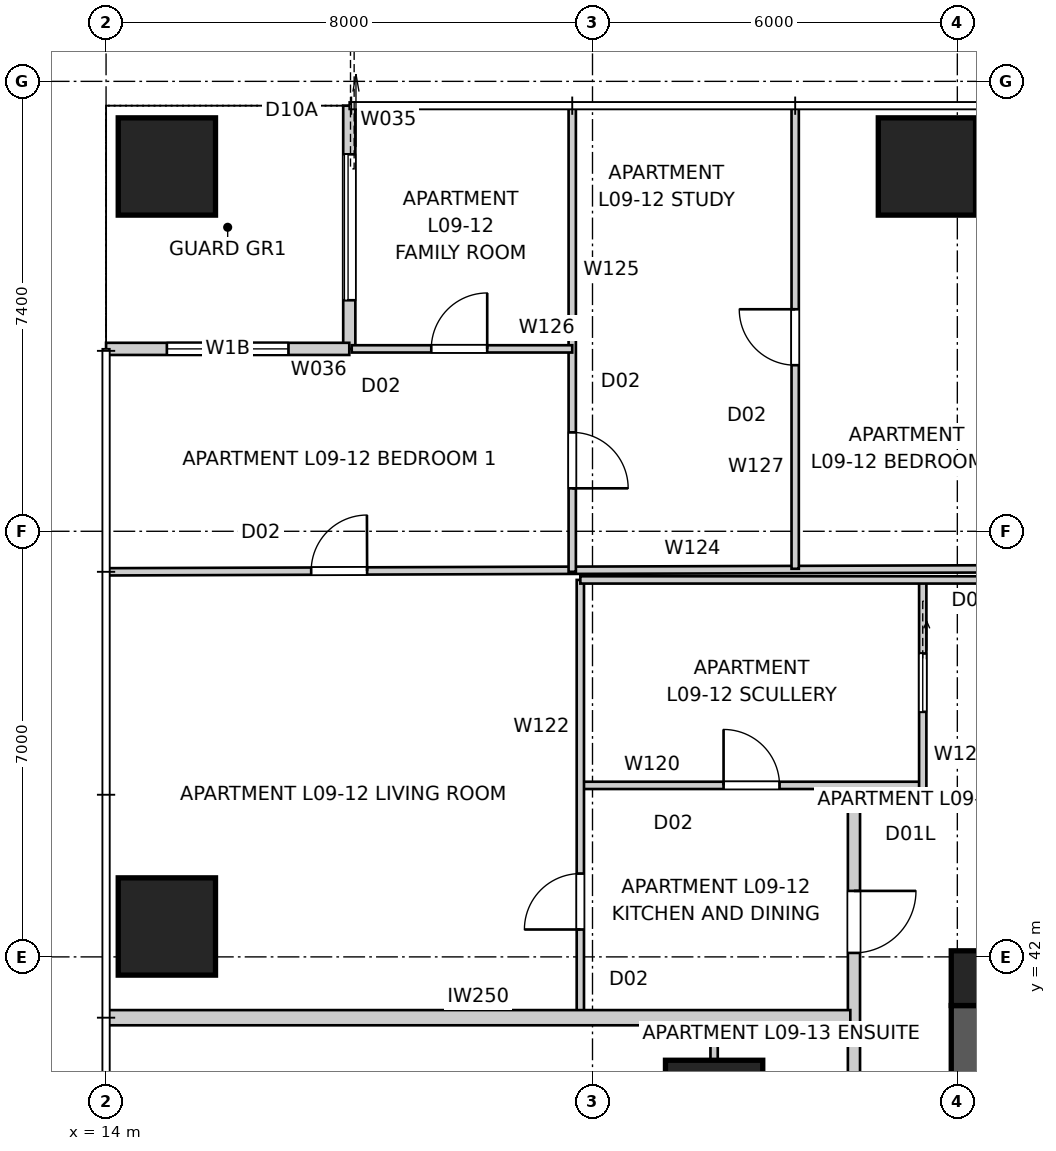
"""IFC4 building model, lengths in metres.
Left out: names, types, materials, properties, quantities, classifications, styles, units other than length and angle.
Written with IfcOpenShell. Run it as: python <this file> out.ifc"""

import sys

from ifc_helpers import new_model, si_unit, direction, frame, frame_2d, origin, origin_2d, place, context, subcontext, project, spatial, polyline, rectangle, outline, extrude, element, fill, save


model = new_model("IFC4")
c1 = context("Model", 3, precision=1e-05, world=origin(), true_north=direction((0.0, 1.0)))
c2 = subcontext(c1, "Body", "Model", "MODEL_VIEW")
j1 = project(units=[si_unit("LENGTHUNIT", "METRE"), si_unit("PLANEANGLEUNIT", "RADIAN")], contexts=[c1])
p1 = place(None, origin())
s1 = spatial("IfcSite", under=j1, at=p1, CompositionType="ELEMENT")
p2 = place(p1, origin())
s2 = spatial("IfcBuilding", under=s1, at=p2, CompositionType="ELEMENT")
p3 = place(p2, frame((0.0, 0.0, 35.4)))
s3 = spatial("IfcBuildingStorey", under=s2, at=p3, CompositionType="ELEMENT", Elevation=35.4)
p4 = place(p3, frame((28.35, 41.2, 0.0), z_axis=(0.0, 0.0, 1.0), x_axis=(0.0, -1.0, 0.0)))
e1 = element("IfcWall", 1, at=p4, inside=s3, PredefinedType="SHEAR", context=c2, shape_type="SweptSolid", body=[
    extrude(outline(polyline([(0.0, -0.45), (22.4, -0.45), (22.4, -0.025), (22.85, -0.025), (22.85, 0.025), (22.4, 0.025), (22.4, 0.45), (0.0, 0.45), (0.0, 0.025), (-0.45, 0.025), (-0.45, -0.025), (0.0, -0.025), (0.0, -0.45)])), origin(), (0.0, 0.0, 1.0), 3.4),
])
p5 = place(p4, frame((11.14, 0.0, 0.0)))
e2 = element("IfcOpeningElement", 2, at=p5, cuts=e1, PredefinedType="OPENING", context=c2, shape_type="SweptSolid", body=[
    extrude(rectangle(XDim=1.02, YDim=2.4, at=frame_2d((0.51, 1.2))), frame((0.0, 0.46, 0.0), z_axis=(0.0, -1.0, 0.0), x_axis=(1.0, 0.0, 0.0)), (0.0, 0.0, 1.0), 0.92),
])
p6 = place(p3, frame((28.35, 41.65, 0.0), z_axis=(0.0, 0.0, 1.0), x_axis=(1.0, 0.0, 0.0)))
e3 = element("IfcColumn", 3, at=p6, inside=s3, PredefinedType="COLUMN", context=c2, shape_type="SweptSolid", body=[
    extrude(rectangle(XDim=0.9, YDim=0.9, at=origin_2d()), origin(), (0.0, 0.0, 1.0), 3.4),
])
for number, where, z_axis, x_axis in (
    (4, (27.5, 55.0, 0.0), (0.0, 0.0, 1.0), (1.0, 0.0, 0.0)),
    (5, (15.0, 55.0, 0.0), (0.0, 0.0, 1.0), (1.0, 0.0, 0.0)),
    (6, (15.0, 42.5, 0.0), (0.0, 0.0, 1.0), (1.0, 0.0, 0.0)),
    (7, (24.0, 39.5, 0.0), (0.0, 0.0, 1.0), (1.0, 0.0, 0.0)),
):
    element("IfcColumn", number, at=place(p3, frame(where, z_axis=z_axis, x_axis=x_axis)), inside=s3, PredefinedType="COLUMN", context=c2, shape_type="SweptSolid", body=[
        extrude(rectangle(XDim=1.6, YDim=1.6, at=origin_2d()), origin(), (0.0, 0.0, 1.0), 3.4),
    ])
p7 = place(p3, frame((18.0, 56.0, 0.0), z_axis=(0.0, 0.0, 1.0), x_axis=(0.0, -1.0, 0.0)))
e8 = element("IfcWall", 8, at=p7, inside=s3, PredefinedType="SOLIDWALL", context=c2, shape_type="SweptSolid", body=[
    extrude(rectangle(XDim=4.0, YDim=0.2, at=frame_2d((2.0, 0.0))), origin(), (0.0, 0.0, 1.0), 3.25),
])
p8 = place(p7, frame((0.8, 0.0, 0.0)))
e9 = element("IfcOpeningElement", 9, at=p8, cuts=e8, PredefinedType="OPENING", context=c2, shape_type="SweptSolid", body=[
    extrude(rectangle(XDim=2.4, YDim=2.1, at=frame_2d((1.2, 1.05))), frame((0.0, 0.11, 0.0), z_axis=(0.0, -1.0, 0.0), x_axis=(1.0, 0.0, 0.0)), (0.0, 0.0, 1.0), 0.22),
])
p9 = place(p3, frame((18.0, 52.0, 0.0), z_axis=(0.0, 0.0, 1.0), x_axis=(-1.0, 0.0, 0.0)))
e10 = element("IfcWall", 10, at=p9, inside=s3, PredefinedType="SOLIDWALL", context=c2, shape_type="SweptSolid", body=[
    extrude(rectangle(XDim=4.0, YDim=0.2, at=frame_2d((2.0, 0.0))), origin(), (0.0, 0.0, 1.0), 3.25),
])
p10 = place(p9, frame((1.0, 0.0, 0.45)))
e11 = element("IfcOpeningElement", 11, at=p10, cuts=e10, PredefinedType="OPENING", context=c2, shape_type="SweptSolid", body=[
    extrude(rectangle(XDim=2.0, YDim=1.8, at=frame_2d((1.0, 0.9))), frame((0.0, 0.11, 0.0), z_axis=(0.0, -1.0, 0.0), x_axis=(1.0, 0.0, 0.0)), (0.0, 0.0, 1.0), 0.22),
])
p11 = place(p3, frame((54.5, 44.5, 0.0), z_axis=(0.0, 0.0, 1.0), x_axis=(-1.0, 0.0, 0.0)))
e12 = element("IfcWall", 12, at=p11, inside=s3, PredefinedType="PARTITIONING", context=c2, shape_type="SweptSolid", body=[
    extrude(rectangle(XDim=28.2, YDim=0.2, at=frame_2d((14.1, 0.0))), origin(), (0.0, 0.0, 1.0), 3.25),
])
p12 = place(p11, frame((5.854, 0.0, 0.0)))
e13 = element("IfcOpeningElement", 13, at=p12, cuts=e12, PredefinedType="OPENING", context=c2, shape_type="SweptSolid", body=[
    extrude(rectangle(XDim=1.02, YDim=2.34, at=frame_2d((0.51, 1.17))), frame((0.0, 0.11, 0.0), z_axis=(0.0, -1.0, 0.0), x_axis=(1.0, 0.0, 0.0)), (0.0, 0.0, 1.0), 0.22),
])
p13 = place(p11, frame((18.518, 0.0, 0.0)))
e14 = element("IfcOpeningElement", 14, at=p13, cuts=e12, PredefinedType="OPENING", context=c2, shape_type="SweptSolid", body=[
    extrude(rectangle(XDim=1.02, YDim=2.34, at=frame_2d((0.51, 1.17))), frame((0.0, 0.11, 0.0), z_axis=(0.0, -1.0, 0.0), x_axis=(1.0, 0.0, 0.0)), (0.0, 0.0, 1.0), 0.22),
])
p14 = place(p11, frame((1.415, 0.0, 0.0)))
e15 = element("IfcOpeningElement", 15, at=p14, cuts=e12, PredefinedType="OPENING", context=c2, shape_type="SweptSolid", body=[
    extrude(rectangle(XDim=1.02, YDim=2.34, at=frame_2d((0.51, 1.17))), frame((0.0, 0.11, 0.0), z_axis=(0.0, -1.0, 0.0), x_axis=(1.0, 0.0, 0.0)), (0.0, 0.0, 1.0), 0.22),
])
p15 = place(p3, frame((26.3, 44.5, 0.0), z_axis=(0.0, 0.0, 1.0), x_axis=(0.0, -1.0, 0.0)))
e16 = element("IfcWall", 16, at=p15, inside=s3, PredefinedType="PARTITIONING", context=c2, shape_type="SweptSolid", body=[
    extrude(rectangle(XDim=28.2, YDim=0.2, at=frame_2d((14.1, 0.0))), origin(), (0.0, 0.0, 1.0), 3.25),
])
p16 = place(p15, frame((11.826, 0.0, 0.0)))
e17 = element("IfcOpeningElement", 17, at=p16, cuts=e16, PredefinedType="OPENING", context=c2, shape_type="SweptSolid", body=[
    extrude(rectangle(XDim=1.02, YDim=2.34, at=frame_2d((0.51, 1.17))), frame((0.0, 0.11, 0.0), z_axis=(0.0, -1.0, 0.0), x_axis=(1.0, 0.0, 0.0)), (0.0, 0.0, 1.0), 0.22),
])
p17 = place(p15, frame((16.048, 0.0, 0.0)))
e18 = element("IfcOpeningElement", 18, at=p17, cuts=e16, PredefinedType="OPENING", context=c2, shape_type="SweptSolid", body=[
    extrude(rectangle(XDim=1.02, YDim=2.34, at=frame_2d((0.51, 1.17))), frame((0.0, 0.11, 0.0), z_axis=(0.0, -1.0, 0.0), x_axis=(1.0, 0.0, 0.0)), (0.0, 0.0, 1.0), 0.22),
])
p18 = place(p15, frame((1.415, 0.0, 0.0)))
e19 = element("IfcOpeningElement", 19, at=p18, cuts=e16, PredefinedType="OPENING", context=c2, shape_type="SweptSolid", body=[
    extrude(rectangle(XDim=1.02, YDim=2.1, at=frame_2d((0.51, 1.05))), frame((0.0, 0.11, 0.0), z_axis=(0.0, -1.0, 0.0), x_axis=(1.0, 0.0, 0.0)), (0.0, 0.0, 1.0), 0.22),
])
p19 = place(p3, frame((14.0, 41.0, 0.0), z_axis=(0.0, 0.0, 1.0), x_axis=(1.0, 0.0, 0.0)))
e20 = element("IfcWall", 20, at=p19, inside=s3, PredefinedType="PARTITIONING", context=c2, shape_type="SweptSolid", body=[
    extrude(rectangle(XDim=12.24, YDim=0.25, at=frame_2d((6.12, 0.0))), origin(), (0.0, 0.0, 1.0), 3.25),
])
p20 = place(p3, frame((21.8, 44.821, 0.0), z_axis=(0.0, 0.0, 1.0), x_axis=(1.0, 0.0, 0.0)))
e21 = element("IfcWall", 21, at=p20, inside=s3, PredefinedType="PARTITIONING", context=c2, shape_type="SweptSolid", body=[
    extrude(rectangle(XDim=5.631, YDim=0.12, at=frame_2d((2.815, 0.0))), origin(), (0.0, 0.0, 1.0), 3.25),
])
p21 = place(p20, frame((2.355, 0.0, 0.0)))
e22 = element("IfcOpeningElement", 22, at=p21, cuts=e21, PredefinedType="OPENING", context=c2, shape_type="SweptSolid", body=[
    extrude(rectangle(XDim=0.92, YDim=2.34, at=frame_2d((0.46, 1.17))), frame((0.0, 0.07, 0.0), z_axis=(0.0, -1.0, 0.0), x_axis=(1.0, 0.0, 0.0)), (0.0, 0.0, 1.0), 0.14),
])
p22 = place(p3, frame((27.431, 48.2, 0.0), z_axis=(0.0, 0.0, 1.0), x_axis=(0.0, -1.0, 0.0)))
e23 = element("IfcWall", 23, at=p22, inside=s3, PredefinedType="PARTITIONING", context=c2, shape_type="SweptSolid", body=[
    extrude(rectangle(XDim=3.6, YDim=0.12, at=frame_2d((1.8, 0.0))), origin(), (0.0, 0.0, 1.0), 3.25),
])
p23 = place(p22, frame((1.209, 0.0, 0.0)))
e24 = element("IfcOpeningElement", 24, at=p23, cuts=e23, PredefinedType="OPENING", context=c2, shape_type="SweptSolid", body=[
    extrude(rectangle(XDim=0.96, YDim=2.1, at=frame_2d((0.48, 1.05))), frame((0.0, 0.07, 0.0), z_axis=(0.0, -1.0, 0.0), x_axis=(1.0, 0.0, 0.0)), (0.0, 0.0, 1.0), 0.14),
])
p24 = place(p3, frame((21.8, 41.0, 0.0), z_axis=(0.0, 0.0, 1.0), x_axis=(0.0, 1.0, 0.0)))
e25 = element("IfcWall", 25, at=p24, inside=s3, PredefinedType="PARTITIONING", context=c2, shape_type="SweptSolid", body=[
    extrude(rectangle(XDim=7.2, YDim=0.12, at=frame_2d((3.6, 0.0))), origin(), (0.0, 0.0, 1.0), 3.25),
])
p25 = place(p24, frame((1.45, 0.0, 0.0)))
e26 = element("IfcOpeningElement", 26, at=p25, cuts=e25, PredefinedType="OPENING", context=c2, shape_type="SweptSolid", body=[
    extrude(rectangle(XDim=0.92, YDim=2.34, at=frame_2d((0.46, 1.17))), frame((0.0, 0.07, 0.0), z_axis=(0.0, -1.0, 0.0), x_axis=(1.0, 0.0, 0.0)), (0.0, 0.0, 1.0), 0.14),
])
p26 = place(p3, frame((21.8, 48.2, 0.0), z_axis=(0.0, 0.0, 1.0), x_axis=(1.0, 0.0, 0.0)))
e27 = element("IfcWall", 27, at=p26, inside=s3, PredefinedType="PARTITIONING", context=c2, shape_type="SweptSolid", body=[
    extrude(rectangle(XDim=7.2, YDim=0.12, at=frame_2d((3.6, 0.0))), origin(), (0.0, 0.0, 1.0), 3.25),
])
p27 = place(p3, frame((14.04, 48.333, 0.0), z_axis=(0.0, 0.0, 1.0), x_axis=(0.9999944038, 0.003345499915, 0.0)))
e28 = element("IfcWall", 28, at=p27, inside=s3, PredefinedType="PARTITIONING", context=c2, shape_type="SweptSolid", body=[
    extrude(rectangle(XDim=14.96, YDim=0.12, at=frame_2d((7.48, 0.0))), origin(), (0.0, 0.0, 1.0), 3.25),
])
p28 = place(p27, frame((3.333, 0.0, 0.0)))
e29 = element("IfcOpeningElement", 29, at=p28, cuts=e28, PredefinedType="OPENING", context=c2, shape_type="SweptSolid", body=[
    extrude(rectangle(XDim=0.92, YDim=2.34, at=frame_2d((0.46, 1.17))), frame((0.0, 0.07, 0.0), z_axis=(0.0, -1.0, 0.0), x_axis=(1.0, 0.0, 0.0)), (0.0, 0.0, 1.0), 0.14),
])
p29 = place(p3, frame((21.667, 55.96, 0.0), z_axis=(0.0, 0.0, 1.0), x_axis=(0.0, -1.0, 0.0)))
e30 = element("IfcWall", 30, at=p29, inside=s3, PredefinedType="PARTITIONING", context=c2, shape_type="SweptSolid", body=[
    extrude(rectangle(XDim=7.627, YDim=0.12, at=frame_2d((3.813, 0.0))), origin(), (0.0, 0.0, 1.0), 3.25),
])
p30 = place(p29, frame((5.333, 0.0, 0.0)))
e31 = element("IfcOpeningElement", 31, at=p30, cuts=e30, PredefinedType="OPENING", context=c2, shape_type="SweptSolid", body=[
    extrude(rectangle(XDim=0.92, YDim=2.34, at=frame_2d((0.46, 1.17))), frame((0.0, 0.07, 0.0), z_axis=(0.0, -1.0, 0.0), x_axis=(1.0, 0.0, 0.0)), (0.0, 0.0, 1.0), 0.14),
])
p31 = place(p3, frame((18.04, 52.0, 0.0), z_axis=(0.0, 0.0, 1.0), x_axis=(1.0, 0.0, 0.0)))
e32 = element("IfcWall", 32, at=p31, inside=s3, PredefinedType="PARTITIONING", context=c2, shape_type="SweptSolid", body=[
    extrude(rectangle(XDim=3.627, YDim=0.12, at=frame_2d((1.813, 0.0))), origin(), (0.0, 0.0, 1.0), 3.25),
])
p32 = place(p31, frame((1.308, 0.0, 0.0)))
e33 = element("IfcOpeningElement", 33, at=p32, cuts=e32, PredefinedType="OPENING", context=c2, shape_type="SweptSolid", body=[
    extrude(rectangle(XDim=0.92, YDim=2.34, at=frame_2d((0.46, 1.17))), frame((0.0, 0.07, 0.0), z_axis=(0.0, -1.0, 0.0), x_axis=(1.0, 0.0, 0.0)), (0.0, 0.0, 1.0), 0.14),
])
p33 = place(p3, frame((25.333, 48.383, 0.0), z_axis=(0.0, 0.0, 1.0), x_axis=(0.0, 1.0, 0.0)))
e34 = element("IfcWall", 34, at=p33, inside=s3, PredefinedType="PARTITIONING", context=c2, shape_type="SweptSolid", body=[
    extrude(rectangle(XDim=7.577, YDim=0.12, at=frame_2d((3.788, 0.0))), origin(), (0.0, 0.0, 1.0), 2.638),
])
p34 = place(p33, frame((3.348, 0.0, 0.0)))
e35 = element("IfcOpeningElement", 35, at=p34, cuts=e34, PredefinedType="OPENING", context=c2, shape_type="SweptSolid", body=[
    extrude(rectangle(XDim=0.92, YDim=2.34, at=frame_2d((0.46, 1.17))), frame((0.0, 0.07, 0.0), z_axis=(0.0, -1.0, 0.0), x_axis=(1.0, 0.0, 0.0)), (0.0, 0.0, 1.0), 0.14),
])
p35 = place(p3, frame((24.0, 37.722, 0.0), z_axis=(0.0, 0.0, 1.0), x_axis=(0.0, 1.0, 0.0)))
e36 = element("IfcWall", 36, at=p35, inside=s3, PredefinedType="PARTITIONING", context=c2, shape_type="SweptSolid", body=[
    extrude(rectangle(XDim=3.278, YDim=0.12, at=frame_2d((1.639, 0.0))), origin(), (0.0, 0.0, 1.0), 2.549),
])
p36 = place(p8, origin())
e37 = element("IfcDoor", 37, at=p36, inside=s3, OperationType="SLIDING_TO_LEFT", PredefinedType="DOOR", context=c2, shape_type="SweptSolid", body=[
    extrude(rectangle(XDim=2.4, YDim=2.1, at=frame_2d((1.2, 1.05))), frame((0.0, 0.025, 0.0), z_axis=(0.0, -1.0, 0.0), x_axis=(1.0, 0.0, 0.0)), (0.0, 0.0, 1.0), 0.05),
])
fill(e9, e37)
p37 = place(p10, origin())
e38 = element("IfcWindow", 38, at=p37, inside=s3, PartitioningType="SINGLE_PANEL", PredefinedType="WINDOW", context=c2, shape_type="SweptSolid", body=[
    extrude(rectangle(XDim=2.0, YDim=1.8, at=frame_2d((1.0, 0.9))), frame((0.0, 0.03, 0.0), z_axis=(0.0, -1.0, 0.0), x_axis=(1.0, 0.0, 0.0)), (0.0, 0.0, 1.0), 0.06),
])
fill(e11, e38)
p38 = place(p18, origin())
e39 = element("IfcDoor", 39, at=p38, inside=s3, OperationType="SINGLE_SWING_LEFT", PredefinedType="DOOR", context=c2, shape_type="SweptSolid", body=[
    extrude(rectangle(XDim=1.02, YDim=2.1, at=frame_2d((0.51, 1.05))), frame((0.0, 0.025, 0.0), z_axis=(0.0, -1.0, 0.0), x_axis=(1.0, 0.0, 0.0)), (0.0, 0.0, 1.0), 0.05),
])
fill(e19, e39)
p39 = place(p21, origin())
e40 = element("IfcDoor", 40, at=p39, inside=s3, OperationType="SINGLE_SWING_LEFT", PredefinedType="DOOR", context=c2, shape_type="SweptSolid", body=[
    extrude(rectangle(XDim=0.92, YDim=2.34, at=frame_2d((0.46, 1.17))), frame((0.0, 0.025, 0.0), z_axis=(0.0, -1.0, 0.0), x_axis=(1.0, 0.0, 0.0)), (0.0, 0.0, 1.0), 0.05),
])
fill(e22, e40)
p40 = place(p25, origin())
e41 = element("IfcDoor", 41, at=p40, inside=s3, OperationType="SINGLE_SWING_LEFT", PredefinedType="DOOR", context=c2, shape_type="SweptSolid", body=[
    extrude(rectangle(XDim=0.92, YDim=2.34, at=frame_2d((0.46, 1.17))), frame((0.0, 0.025, 0.0), z_axis=(0.0, -1.0, 0.0), x_axis=(1.0, 0.0, 0.0)), (0.0, 0.0, 1.0), 0.05),
])
fill(e26, e41)
p41 = place(p23, origin())
e42 = element("IfcDoor", 42, at=p41, inside=s3, OperationType="SLIDING_TO_LEFT", PredefinedType="DOOR", context=c2, shape_type="SweptSolid", body=[
    extrude(rectangle(XDim=0.96, YDim=2.1, at=frame_2d((0.48, 1.05))), frame((0.0, 0.025, 0.0), z_axis=(0.0, -1.0, 0.0), x_axis=(1.0, 0.0, 0.0)), (0.0, 0.0, 1.0), 0.05),
])
fill(e24, e42)
p42 = place(p28, origin())
e43 = element("IfcDoor", 43, at=p42, inside=s3, OperationType="SINGLE_SWING_RIGHT", PredefinedType="DOOR", context=c2, shape_type="SweptSolid", body=[
    extrude(rectangle(XDim=0.92, YDim=2.34, at=frame_2d((0.46, 1.17))), frame((0.0, 0.025, 0.0), z_axis=(0.0, -1.0, 0.0), x_axis=(1.0, 0.0, 0.0)), (0.0, 0.0, 1.0), 0.05),
])
fill(e29, e43)
p43 = place(p32, origin())
e44 = element("IfcDoor", 44, at=p43, inside=s3, OperationType="SINGLE_SWING_RIGHT", PredefinedType="DOOR", context=c2, shape_type="SweptSolid", body=[
    extrude(rectangle(XDim=0.92, YDim=2.34, at=frame_2d((0.46, 1.17))), frame((0.0, 0.025, 0.0), z_axis=(0.0, -1.0, 0.0), x_axis=(1.0, 0.0, 0.0)), (0.0, 0.0, 1.0), 0.05),
])
fill(e33, e44)
p44 = place(p30, origin())
e45 = element("IfcDoor", 45, at=p44, inside=s3, OperationType="SINGLE_SWING_RIGHT", PredefinedType="DOOR", context=c2, shape_type="SweptSolid", body=[
    extrude(rectangle(XDim=0.92, YDim=2.34, at=frame_2d((0.46, 1.17))), frame((0.0, 0.025, 0.0), z_axis=(0.0, -1.0, 0.0), x_axis=(1.0, 0.0, 0.0)), (0.0, 0.0, 1.0), 0.05),
])
fill(e31, e45)
p45 = place(p34, origin())
e46 = element("IfcDoor", 46, at=p45, inside=s3, OperationType="SINGLE_SWING_RIGHT", PredefinedType="DOOR", context=c2, shape_type="SweptSolid", body=[
    extrude(rectangle(XDim=0.92, YDim=2.34, at=frame_2d((0.46, 1.17))), frame((0.0, 0.025, 0.0), z_axis=(0.0, -1.0, 0.0), x_axis=(1.0, 0.0, 0.0)), (0.0, 0.0, 1.0), 0.05),
])
fill(e35, e46)
save(model, sys.argv[1])
